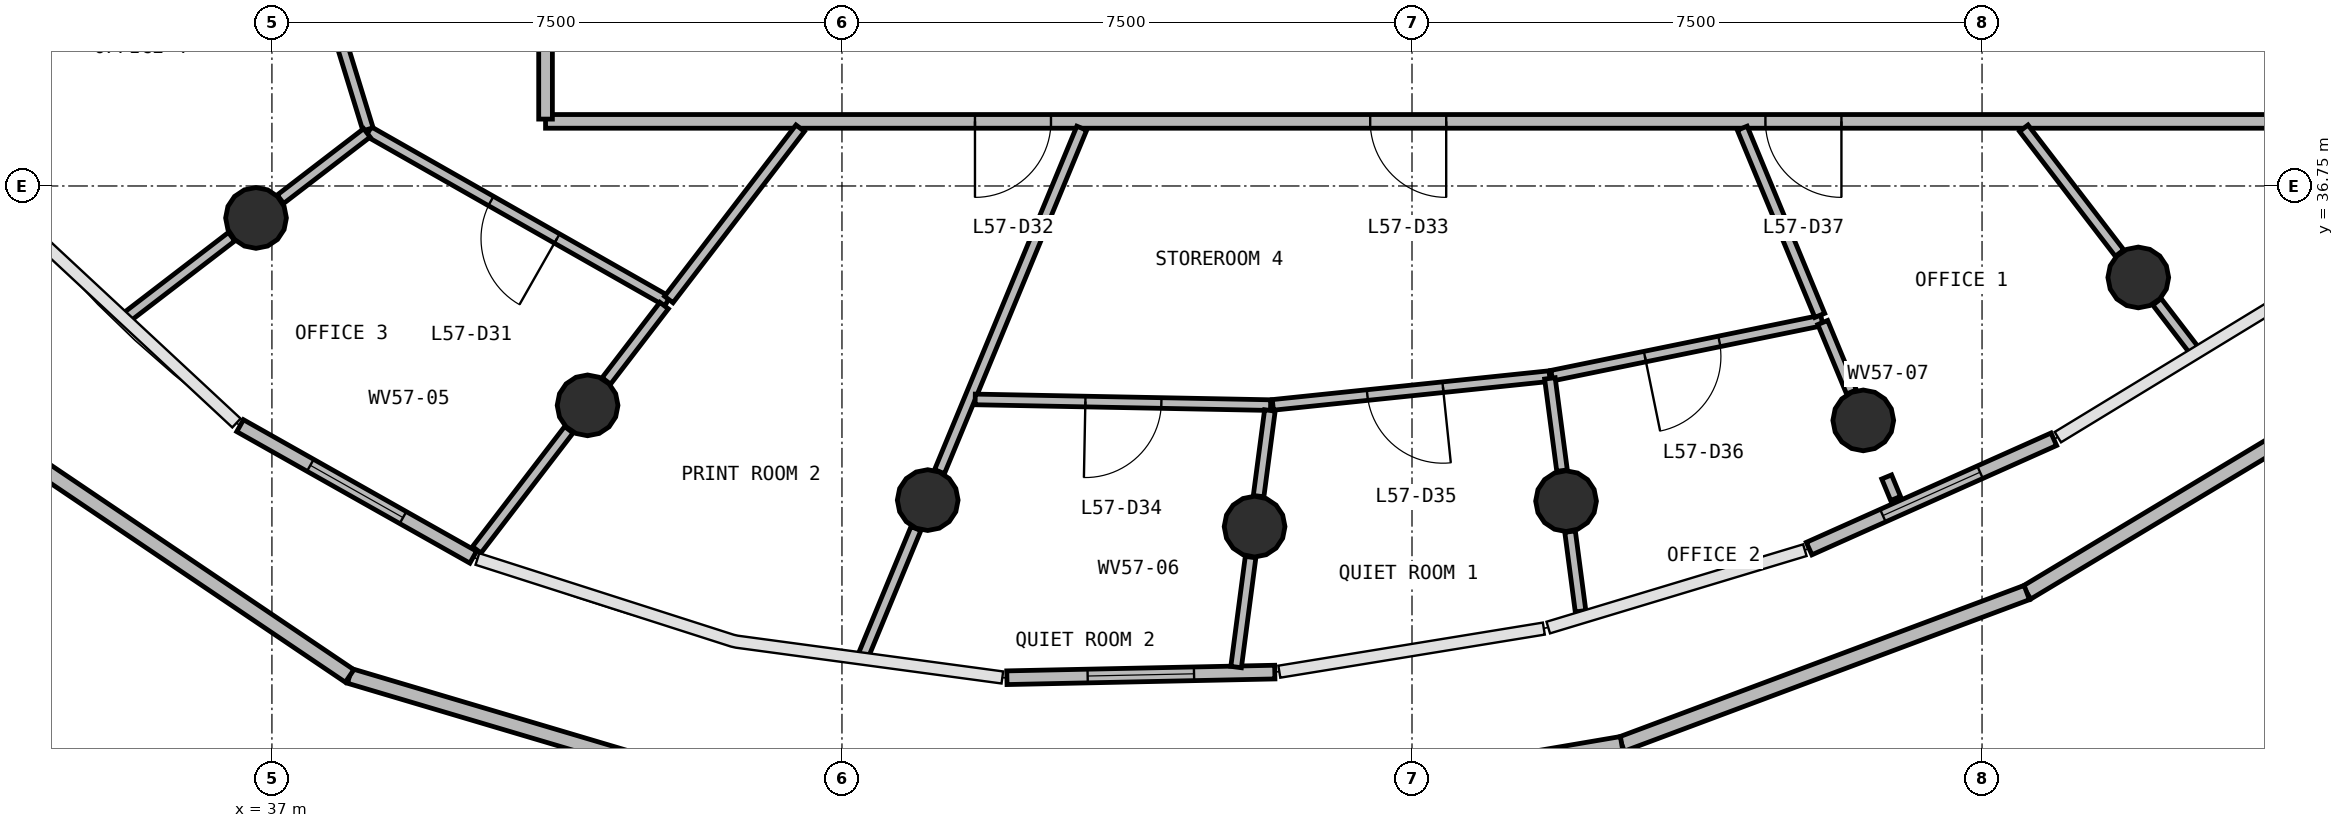
"""IFC4 building model, lengths in metres.
Left out: names, types, materials, properties, quantities, classifications, styles, units other than length and angle.
Written with IfcOpenShell. Run it as: python <this file> out.ifc"""

import sys

from ifc_helpers import new_model, si_unit, direction, frame, frame_2d, origin, origin_2d, place, context, subcontext, project, spatial, rectangle, circle, extrude, source, transform, mapped, element, fill, save


model = new_model("IFC4")
c1 = context("Model", 3, precision=1e-05, world=origin(), true_north=direction((0.0, 1.0)))
c2 = subcontext(c1, "Body", "Model", "MODEL_VIEW")
j1 = project(units=[si_unit("LENGTHUNIT", "METRE"), si_unit("PLANEANGLEUNIT", "RADIAN")], contexts=[c1])
p1 = place(None, origin())
s1 = spatial("IfcSite", under=j1, at=p1, CompositionType="ELEMENT")
p2 = place(p1, origin())
s2 = spatial("IfcBuilding", under=s1, at=p2, CompositionType="ELEMENT")
p3 = place(p2, frame((0.0, 0.0, 234.5)))
s3 = spatial("IfcBuildingStorey", under=s2, at=p3, CompositionType="ELEMENT", Elevation=234.5)
m1 = source(origin(), c2, "Body", "SweptSolid", [
    extrude(circle(Radius=0.4, at=origin_2d()), origin(), (0.0, 0.0, 1.0), 4.22),
])
for number, where, z_axis, x_axis in (
    (1, (36.791, 36.329, -0.32), (0.0, 0.0, 1.0), (1.0, 0.0, 0.0)),
    (2, (41.153, 33.864, -0.32), (0.0, 0.0, 1.0), (1.0, 0.0, 0.0)),
    (3, (45.628, 32.617, -0.32), (0.0, 0.0, 1.0), (1.0, 0.0, 0.0)),
    (4, (49.929, 32.269, -0.32), (0.0, 0.0, 1.0), (1.0, 0.0, 0.0)),
    (5, (54.027, 32.604, -0.32), (0.0, 0.0, 1.0), (1.0, 0.0, 0.0)),
    (6, (57.937, 33.666, -0.32), (0.0, 0.0, 1.0), (1.0, 0.0, 0.0)),
    (7, (61.556, 35.547, -0.32), (0.0, 0.0, 1.0), (1.0, 0.0, 0.0)),
):
    element("IfcColumn", number, at=place(p3, frame(where, z_axis=z_axis, x_axis=x_axis)), inside=s3, PredefinedType="COLUMN", context=c2, shape_type="MappedRepresentation", body=[
        mapped(m1, transform((0.0, 0.0, 0.0), scale=1.0)),
    ])
p4 = place(p3, frame((36.581, 33.597, 0.0), z_axis=(0.0, 0.0, 1.0), x_axis=(0.870989877484, -0.491300960023, 0.0)))
e8 = element("IfcWall", 8, at=p4, inside=s3, PredefinedType="STANDARD", context=c2, shape_type="SweptSolid", body=[
    extrude(rectangle(XDim=3.522, YDim=0.18, at=frame_2d((1.761, 0.0))), origin(), (0.0, 0.0, 1.0), 3.58),
])
p5 = place(p4, frame((1.061, 0.0, 0.9)))
e9 = element("IfcOpeningElement", 9, at=p5, cuts=e8, PredefinedType="OPENING", context=c2, shape_type="SweptSolid", body=[
    extrude(rectangle(XDim=1.4, YDim=2.0, at=frame_2d((0.7, 1.0))), frame((0.0, 0.1, 0.0), z_axis=(0.0, -1.0, 0.0), x_axis=(1.0, 0.0, 0.0)), (0.0, 0.0, 1.0), 0.2),
])
p6 = place(p3, frame((46.67, 30.281, 0.0), z_axis=(0.0, 0.0, 1.0), x_axis=(0.999778374941, 0.021052339543, 0.0)))
e10 = element("IfcWall", 10, at=p6, inside=s3, PredefinedType="STANDARD", context=c2, shape_type="SweptSolid", body=[
    extrude(rectangle(XDim=3.525, YDim=0.18, at=frame_2d((1.763, 0.0))), origin(), (0.0, 0.0, 1.0), 3.58),
])
p7 = place(p6, frame((1.063, 0.0, 0.9)))
e11 = element("IfcOpeningElement", 11, at=p7, cuts=e10, PredefinedType="OPENING", context=c2, shape_type="SweptSolid", body=[
    extrude(rectangle(XDim=1.4, YDim=2.0, at=frame_2d((0.7, 1.0))), frame((0.0, 0.1, 0.0), z_axis=(0.0, -1.0, 0.0), x_axis=(1.0, 0.0, 0.0)), (0.0, 0.0, 1.0), 0.2),
])
p8 = place(p3, frame((57.225, 31.979, 0.0), z_axis=(0.0, 0.0, 1.0), x_axis=(0.913021877142, 0.407910592973, 0.0)))
e12 = element("IfcWall", 12, at=p8, inside=s3, PredefinedType="STANDARD", context=c2, shape_type="SweptSolid", body=[
    extrude(rectangle(XDim=3.526, YDim=0.18, at=frame_2d((1.763, 0.0))), origin(), (0.0, 0.0, 1.0), 3.58),
])
p9 = place(p8, frame((1.063, 0.0, 0.9)))
e13 = element("IfcOpeningElement", 13, at=p9, cuts=e12, PredefinedType="OPENING", context=c2, shape_type="SweptSolid", body=[
    extrude(rectangle(XDim=1.4, YDim=2.0, at=frame_2d((0.7, 1.0))), frame((0.0, 0.1, 0.0), z_axis=(0.0, -1.0, 0.0), x_axis=(1.0, 0.0, 0.0)), (0.0, 0.0, 1.0), 0.2),
])
p10 = place(p3, frame((64.967, 34.332, 0.0), z_axis=(0.0, 0.0, 1.0), x_axis=(-0.857208875939, -0.51496887577, 0.0)))
e14 = element("IfcWall", 14, at=p10, inside=s3, PredefinedType="PARAPET", context=c2, shape_type="SweptSolid", body=[
    extrude(rectangle(XDim=5.69, YDim=0.2, at=frame_2d((2.845, 0.0))), origin(), (0.0, 0.0, 1.0), 1.1),
])
p11 = place(p3, frame((60.089, 31.401, 0.0), z_axis=(0.0, 0.0, 1.0), x_axis=(-0.936639117681, -0.350295822456, 0.0)))
e15 = element("IfcWall", 15, at=p11, inside=s3, PredefinedType="PARAPET", context=c2, shape_type="SweptSolid", body=[
    extrude(rectangle(XDim=5.691, YDim=0.2, at=frame_2d((2.845, 0.0))), origin(), (0.0, 0.0, 1.0), 1.1),
])
p12 = place(p3, frame((54.759, 29.408, 0.0), z_axis=(0.0, 0.0, 1.0), x_axis=(-0.985817393896, -0.167821529883, 0.0)))
e16 = element("IfcWall", 16, at=p12, inside=s3, PredefinedType="PARAPET", context=c2, shape_type="SweptSolid", body=[
    extrude(rectangle(XDim=5.69, YDim=0.2, at=frame_2d((2.845, 0.0))), origin(), (0.0, 0.0, 1.0), 1.1),
])
p13 = place(p3, frame((43.468, 28.687, 0.0), z_axis=(0.0, 0.0, 1.0), x_axis=(-0.958624512287, 0.284673575244, 0.0)))
e17 = element("IfcWall", 17, at=p13, inside=s3, PredefinedType="PARAPET", context=c2, shape_type="SweptSolid", body=[
    extrude(rectangle(XDim=5.681, YDim=0.2, at=frame_2d((2.84, 0.0))), origin(), (0.0, 0.0, 1.0), 1.1),
])
p14 = place(p3, frame((38.022, 30.304, 0.0), z_axis=(0.0, 0.0, 1.0), x_axis=(-0.828871130332, 0.559439585033, 0.0)))
e18 = element("IfcWall", 18, at=p14, inside=s3, PredefinedType="PARAPET", context=c2, shape_type="SweptSolid", body=[
    extrude(rectangle(XDim=5.671, YDim=0.2, at=frame_2d((2.836, 0.0))), origin(), (0.0, 0.0, 1.0), 1.1),
])
p15 = place(p3, frame((63.4, 37.6, 0.0), z_axis=(0.0, 0.0, 1.0), x_axis=(-1.0, 0.0, 0.0)))
e19 = element("IfcWall", 19, at=p15, inside=s3, PredefinedType="PARTITIONING", context=c2, shape_type="SweptSolid", body=[
    extrude(rectangle(XDim=22.8, YDim=0.18, at=frame_2d((11.4, 0.0))), origin(), (0.0, 0.0, 1.0), 2.88),
])
p16 = place(p15, frame((16.15, 0.0, 0.0)))
e20 = element("IfcOpeningElement", 20, at=p16, cuts=e19, PredefinedType="OPENING", context=c2, shape_type="SweptSolid", body=[
    extrude(rectangle(XDim=1.0, YDim=2.1, at=frame_2d((0.5, 1.05))), frame((0.0, 0.1, 0.0), z_axis=(0.0, -1.0, 0.0), x_axis=(1.0, 0.0, 0.0)), (0.0, 0.0, 1.0), 0.2),
])
p17 = place(p15, frame((10.95, 0.0, 0.0)))
e21 = element("IfcOpeningElement", 21, at=p17, cuts=e19, PredefinedType="OPENING", context=c2, shape_type="SweptSolid", body=[
    extrude(rectangle(XDim=1.0, YDim=2.1, at=frame_2d((0.5, 1.05))), frame((0.0, 0.1, 0.0), z_axis=(0.0, -1.0, 0.0), x_axis=(1.0, 0.0, 0.0)), (0.0, 0.0, 1.0), 0.2),
])
p18 = place(p15, frame((5.75, 0.0, 0.0)))
e22 = element("IfcOpeningElement", 22, at=p18, cuts=e19, PredefinedType="OPENING", context=c2, shape_type="SweptSolid", body=[
    extrude(rectangle(XDim=1.0, YDim=2.1, at=frame_2d((0.5, 1.05))), frame((0.0, 0.1, 0.0), z_axis=(0.0, -1.0, 0.0), x_axis=(1.0, 0.0, 0.0)), (0.0, 0.0, 1.0), 0.2),
])
p19 = place(p3, frame((40.6, 37.63, 0.0), z_axis=(0.0, 0.0, 1.0), x_axis=(0.0, 1.0, 0.0)))
e23 = element("IfcWall", 23, at=p19, inside=s3, PredefinedType="PARTITIONING", context=c2, shape_type="SweptSolid", body=[
    extrude(rectangle(XDim=20.74, YDim=0.18, at=frame_2d((10.37, 0.0))), origin(), (0.0, 0.0, 1.0), 2.88),
])
p20 = place(p19, frame((9.89, 0.0, 0.0)))
e24 = element("IfcOpeningElement", 24, at=p20, cuts=e23, PredefinedType="OPENING", context=c2, shape_type="SweptSolid", body=[
    extrude(rectangle(XDim=1.0, YDim=2.1, at=frame_2d((0.5, 1.05))), frame((0.0, 0.1, 0.0), z_axis=(0.0, -1.0, 0.0), x_axis=(1.0, 0.0, 0.0)), (0.0, 0.0, 1.0), 0.2),
])
p21 = place(p19, frame((7.69, 0.0, 0.0)))
e25 = element("IfcOpeningElement", 25, at=p21, cuts=e23, PredefinedType="OPENING", context=c2, shape_type="SweptSolid", body=[
    extrude(rectangle(XDim=1.0, YDim=2.1, at=frame_2d((0.5, 1.05))), frame((0.0, 0.1, 0.0), z_axis=(0.0, -1.0, 0.0), x_axis=(1.0, 0.0, 0.0)), (0.0, 0.0, 1.0), 0.2),
])
p22 = place(p3, frame((45.783, 32.992, 0.0), z_axis=(0.0, 0.0, 1.0), x_axis=(0.382689806821, 0.923876892099, 0.0)))
e26 = element("IfcWall", 26, at=p22, inside=s3, PredefinedType="PARTITIONING", context=c2, shape_type="SweptSolid", body=[
    extrude(rectangle(XDim=4.891, YDim=0.14, at=frame_2d((2.445, 0.0))), origin(), (0.0, 0.0, 1.0), 2.88),
])
p23 = place(p3, frame((42.203, 35.233, 0.0), z_axis=(0.0, 0.0, 1.0), x_axis=(-0.869307862445, 0.494271019068, 0.0)))
e27 = element("IfcWall", 27, at=p23, inside=s3, PredefinedType="PARTITIONING", context=c2, shape_type="SweptSolid", body=[
    extrude(rectangle(XDim=4.521, YDim=0.14, at=frame_2d((2.26, 0.0))), origin(), (0.0, 0.0, 1.0), 2.88),
])
p24 = place(p23, frame((1.671, 0.0, 0.0)))
e28 = element("IfcOpeningElement", 28, at=p24, cuts=e27, PredefinedType="OPENING", context=c2, shape_type="SweptSolid", body=[
    extrude(rectangle(XDim=1.0, YDim=2.1, at=frame_2d((0.5, 1.05))), frame((0.0, 0.08, 0.0), z_axis=(0.0, -1.0, 0.0), x_axis=(1.0, 0.0, 0.0)), (0.0, 0.0, 1.0), 0.16),
])
p25 = place(p3, frame((38.264, 37.496, 0.0), z_axis=(0.0, 0.0, 1.0), x_axis=(-0.293913060846, 0.955832157162, 0.0)))
e29 = element("IfcWall", 29, at=p25, inside=s3, PredefinedType="PARTITIONING", context=c2, shape_type="SweptSolid", body=[
    extrude(rectangle(XDim=4.468, YDim=0.14, at=frame_2d((2.234, 0.0))), origin(), (0.0, 0.0, 1.0), 2.88),
])
p26 = place(p25, frame((1.818, 0.0, 0.0)))
e30 = element("IfcOpeningElement", 30, at=p26, cuts=e29, PredefinedType="OPENING", context=c2, shape_type="SweptSolid", body=[
    extrude(rectangle(XDim=1.0, YDim=2.1, at=frame_2d((0.5, 1.05))), frame((0.0, 0.08, 0.0), z_axis=(0.0, -1.0, 0.0), x_axis=(1.0, 0.0, 0.0)), (0.0, 0.0, 1.0), 0.16),
])
p27 = place(p3, frame((41.399, 34.185, 0.0), z_axis=(0.0, 0.0, 1.0), x_axis=(0.608870244727, 0.793269831196, 0.0)))
e31 = element("IfcWall", 31, at=p27, inside=s3, PredefinedType="PARTITIONING", context=c2, shape_type="SweptSolid", body=[
    extrude(rectangle(XDim=1.25, YDim=0.14, at=frame_2d((0.625, 0.0))), origin(), (0.0, 0.0, 1.0), 2.88),
])
p28 = place(p3, frame((42.221, 35.257, 0.0), z_axis=(0.0, 0.0, 1.0), x_axis=(0.608792367533, 0.793329599368, 0.0)))
e32 = element("IfcWall", 32, at=p28, inside=s3, PredefinedType="PARTITIONING", context=c2, shape_type="SweptSolid", body=[
    extrude(rectangle(XDim=2.841, YDim=0.14, at=frame_2d((1.42, 0.0))), origin(), (0.0, 0.0, 1.0), 2.88),
])
p29 = place(p3, frame((50.139, 33.867, 0.0), z_axis=(0.0, 0.0, 1.0), x_axis=(-0.999814117064, 0.019280335046, 0.0)))
e33 = element("IfcWall", 33, at=p29, inside=s3, PredefinedType="PARTITIONING", context=c2, shape_type="SweptSolid", body=[
    extrude(rectangle(XDim=3.887, YDim=0.14, at=frame_2d((1.944, 0.0))), origin(), (0.0, 0.0, 1.0), 2.88),
])
p30 = place(p29, frame((1.437, 0.0, 0.0)))
e34 = element("IfcOpeningElement", 34, at=p30, cuts=e33, PredefinedType="OPENING", context=c2, shape_type="SweptSolid", body=[
    extrude(rectangle(XDim=1.0, YDim=2.1, at=frame_2d((0.5, 1.05))), frame((0.0, 0.08, 0.0), z_axis=(0.0, -1.0, 0.0), x_axis=(1.0, 0.0, 0.0)), (0.0, 0.0, 1.0), 0.16),
])
p31 = place(p3, frame((53.81, 34.249, 0.0), z_axis=(0.0, 0.0, 1.0), x_axis=(-0.994635862238, -0.103438394953, 0.0)))
e35 = element("IfcWall", 35, at=p31, inside=s3, PredefinedType="PARTITIONING", context=c2, shape_type="SweptSolid", body=[
    extrude(rectangle(XDim=3.661, YDim=0.14, at=frame_2d((1.83, 0.0))), origin(), (0.0, 0.0, 1.0), 2.88),
])
p32 = place(p31, frame((1.411, 0.0, 0.0)))
e36 = element("IfcOpeningElement", 36, at=p32, cuts=e35, PredefinedType="OPENING", context=c2, shape_type="SweptSolid", body=[
    extrude(rectangle(XDim=1.0, YDim=2.1, at=frame_2d((0.5, 1.05))), frame((0.0, 0.08, 0.0), z_axis=(0.0, -1.0, 0.0), x_axis=(1.0, 0.0, 0.0)), (0.0, 0.0, 1.0), 0.16),
])
p33 = place(p3, frame((57.392, 34.982, 0.0), z_axis=(0.0, 0.0, 1.0), x_axis=(-0.97970621896, -0.200438829898, 0.0)))
e37 = element("IfcWall", 37, at=p33, inside=s3, PredefinedType="PARTITIONING", context=c2, shape_type="SweptSolid", body=[
    extrude(rectangle(XDim=3.626, YDim=0.14, at=frame_2d((1.813, 0.0))), origin(), (0.0, 0.0, 1.0), 2.88),
])
p34 = place(p33, frame((1.376, 0.0, 0.0)))
e38 = element("IfcOpeningElement", 38, at=p34, cuts=e37, PredefinedType="OPENING", context=c2, shape_type="SweptSolid", body=[
    extrude(rectangle(XDim=1.0, YDim=2.1, at=frame_2d((0.5, 1.05))), frame((0.0, 0.08, 0.0), z_axis=(0.0, -1.0, 0.0), x_axis=(1.0, 0.0, 0.0)), (0.0, 0.0, 1.0), 0.16),
])
p35 = place(p3, frame((56.345, 37.51, 0.0), z_axis=(0.0, 0.0, 1.0), x_axis=(0.382624166052, -0.923904079195, 0.0)))
e39 = element("IfcWall", 39, at=p35, inside=s3, PredefinedType="PARTITIONING", context=c2, shape_type="SweptSolid", body=[
    extrude(rectangle(XDim=2.665, YDim=0.14, at=frame_2d((1.333, 0.0))), origin(), (0.0, 0.0, 1.0), 2.88),
])
p36 = place(p3, frame((60.049, 37.51, 0.0), z_axis=(0.0, 0.0, 1.0), x_axis=(0.608701397958, -0.793399400128, 0.0)))
e40 = element("IfcWall", 40, at=p36, inside=s3, PredefinedType="PARTITIONING", context=c2, shape_type="SweptSolid", body=[
    extrude(rectangle(XDim=2.07, YDim=0.14, at=frame_2d((1.035, 0.0))), origin(), (0.0, 0.0, 1.0), 2.88),
])
p37 = place(p3, frame((39.695, 31.964, 0.0), z_axis=(0.0, 0.0, 1.0), x_axis=(0.608714685666, 0.793389205532, 0.0)))
e41 = element("IfcWall", 41, at=p37, inside=s3, PredefinedType="PARTITIONING", context=c2, shape_type="SweptSolid", body=[
    extrude(rectangle(XDim=1.991, YDim=0.14, at=frame_2d((0.996, 0.0))), origin(), (0.0, 0.0, 1.0), 2.88),
])
p38 = place(p3, frame((45.473, 32.243, 0.0), z_axis=(0.0, 0.0, 1.0), x_axis=(-0.382692713278, -0.923875688177, 0.0)))
e42 = element("IfcWall", 42, at=p38, inside=s3, PredefinedType="PARTITIONING", context=c2, shape_type="SweptSolid", body=[
    extrude(rectangle(XDim=1.813, YDim=0.14, at=frame_2d((0.906, 0.0))), origin(), (0.0, 0.0, 1.0), 2.88),
])
p39 = place(p3, frame((36.469, 36.083, 0.0), z_axis=(0.0, 0.0, 1.0), x_axis=(-0.793354095368, -0.608760444973, 0.0)))
e43 = element("IfcWall", 43, at=p39, inside=s3, PredefinedType="PARTITIONING", context=c2, shape_type="SweptSolid", body=[
    extrude(rectangle(XDim=1.776, YDim=0.14, at=frame_2d((0.888, 0.0))), origin(), (0.0, 0.0, 1.0), 2.88),
])
p40 = place(p3, frame((38.25, 37.449, 0.0), z_axis=(0.0, 0.0, 1.0), x_axis=(-0.793313149545, -0.60881380303, 0.0)))
e44 = element("IfcWall", 44, at=p40, inside=s3, PredefinedType="PARTITIONING", context=c2, shape_type="SweptSolid", body=[
    extrude(rectangle(XDim=1.434, YDim=0.14, at=frame_2d((0.717, 0.0))), origin(), (0.0, 0.0, 1.0), 2.88),
])
p41 = place(p3, frame((49.876, 31.868, 0.0), z_axis=(0.0, 0.0, 1.0), x_axis=(-0.130519440536, -0.991445750226, 0.0)))
e45 = element("IfcWall", 45, at=p41, inside=s3, PredefinedType="PARTITIONING", context=c2, shape_type="SweptSolid", body=[
    extrude(rectangle(XDim=1.459, YDim=0.14, at=frame_2d((0.729, 0.0))), origin(), (0.0, 0.0, 1.0), 2.88),
])
p42 = place(p3, frame((53.814, 34.219, 0.0), z_axis=(0.0, 0.0, 1.0), x_axis=(0.130583439875, -0.991437322896, 0.0)))
e46 = element("IfcWall", 46, at=p42, inside=s3, PredefinedType="PARTITIONING", context=c2, shape_type="SweptSolid", body=[
    extrude(rectangle(XDim=1.225, YDim=0.14, at=frame_2d((0.612, 0.0))), origin(), (0.0, 0.0, 1.0), 2.88),
])
p43 = place(p3, frame((50.13, 33.797, 0.0), z_axis=(0.0, 0.0, 1.0), x_axis=(-0.13056005306, -0.991440402921, 0.0)))
e47 = element("IfcWall", 47, at=p43, inside=s3, PredefinedType="PARTITIONING", context=c2, shape_type="SweptSolid", body=[
    extrude(rectangle(XDim=1.137, YDim=0.14, at=frame_2d((0.568, 0.0))), origin(), (0.0, 0.0, 1.0), 2.88),
])
p44 = place(p3, frame((54.08, 32.203, 0.0), z_axis=(0.0, 0.0, 1.0), x_axis=(0.13054416447, -0.991442495116, 0.0)))
e48 = element("IfcWall", 48, at=p44, inside=s3, PredefinedType="PARTITIONING", context=c2, shape_type="SweptSolid", body=[
    extrude(rectangle(XDim=1.057, YDim=0.14, at=frame_2d((0.528, 0.0))), origin(), (0.0, 0.0, 1.0), 2.88),
])
p45 = place(p3, frame((57.404, 34.954, 0.0), z_axis=(0.0, 0.0, 1.0), x_axis=(0.382686140255, -0.923878410862, 0.0)))
e49 = element("IfcWall", 49, at=p45, inside=s3, PredefinedType="PARTITIONING", context=c2, shape_type="SweptSolid", body=[
    extrude(rectangle(XDim=0.989, YDim=0.14, at=frame_2d((0.494, 0.0))), origin(), (0.0, 0.0, 1.0), 2.88),
])
p46 = place(p3, frame((61.802, 35.226, 0.0), z_axis=(0.0, 0.0, 1.0), x_axis=(0.608755530265, -0.793357866522, 0.0)))
e50 = element("IfcWall", 50, at=p46, inside=s3, PredefinedType="PARTITIONING", context=c2, shape_type="SweptSolid", body=[
    extrude(rectangle(XDim=0.791, YDim=0.14, at=frame_2d((0.396, 0.0))), origin(), (0.0, 0.0, 1.0), 2.88),
])
p47 = place(p3, frame((58.245, 32.922, 0.0), z_axis=(0.0, 0.0, 1.0), x_axis=(0.382468842715, -0.92396838926, 0.0)))
e51 = element("IfcWall", 51, at=p47, inside=s3, PredefinedType="PARTITIONING", context=c2, shape_type="SweptSolid", body=[
    extrude(rectangle(XDim=0.307, YDim=0.14, at=frame_2d((0.154, 0.0))), origin(), (0.0, 0.0, 1.0), 2.88),
])
m2 = source(origin(), c2, "Body", "SweptSolid", [
    extrude(rectangle(XDim=1.4, YDim=2.0, at=frame_2d((0.7, 1.0))), frame((0.0, 0.03, 0.0), z_axis=(0.0, -1.0, 0.0), x_axis=(1.0, 0.0, 0.0)), (0.0, 0.0, 1.0), 0.06),
])
p48 = place(p5, origin())
e52 = element("IfcWindow", 52, at=p48, inside=s3, PartitioningType="SINGLE_PANEL", PredefinedType="WINDOW", context=c2, shape_type="MappedRepresentation", body=[
    mapped(m2, transform((0.0, 0.0, 0.0), scale=1.0)),
])
fill(e9, e52)
p49 = place(p7, origin())
e53 = element("IfcWindow", 53, at=p49, inside=s3, PartitioningType="SINGLE_PANEL", PredefinedType="WINDOW", context=c2, shape_type="MappedRepresentation", body=[
    mapped(m2, transform((0.0, 0.0, 0.0), scale=1.0)),
])
fill(e11, e53)
p50 = place(p9, origin())
e54 = element("IfcWindow", 54, at=p50, inside=s3, PartitioningType="SINGLE_PANEL", PredefinedType="WINDOW", context=c2, shape_type="MappedRepresentation", body=[
    mapped(m2, transform((0.0, 0.0, 0.0), scale=1.0)),
])
fill(e13, e54)
m3 = source(origin(), c2, "Body", "SweptSolid", [
    extrude(rectangle(XDim=1.0, YDim=2.1, at=frame_2d((0.5, 1.05))), frame((0.0, 0.025, 0.0), z_axis=(0.0, -1.0, 0.0), x_axis=(1.0, 0.0, 0.0)), (0.0, 0.0, 1.0), 0.05),
])
p51 = place(p24, origin())
e55 = element("IfcDoor", 55, at=p51, inside=s3, OperationType="SINGLE_SWING_LEFT", PredefinedType="DOOR", context=c2, shape_type="MappedRepresentation", body=[
    mapped(m3, transform((0.0, 0.0, 0.0), scale=1.0)),
])
fill(e28, e55)
p52 = place(p16, origin())
e56 = element("IfcDoor", 56, at=p52, inside=s3, OperationType="SINGLE_SWING_RIGHT", PredefinedType="DOOR", context=c2, shape_type="MappedRepresentation", body=[
    mapped(m3, transform((0.0, 0.0, 0.0), scale=1.0)),
])
fill(e20, e56)
p53 = place(p17, origin())
e57 = element("IfcDoor", 57, at=p53, inside=s3, OperationType="SINGLE_SWING_LEFT", PredefinedType="DOOR", context=c2, shape_type="MappedRepresentation", body=[
    mapped(m3, transform((0.0, 0.0, 0.0), scale=1.0)),
])
fill(e21, e57)
p54 = place(p30, origin())
e58 = element("IfcDoor", 58, at=p54, inside=s3, OperationType="SINGLE_SWING_RIGHT", PredefinedType="DOOR", context=c2, shape_type="MappedRepresentation", body=[
    mapped(m3, transform((0.0, 0.0, 0.0), scale=1.0)),
])
fill(e34, e58)
p55 = place(p32, origin())
e59 = element("IfcDoor", 59, at=p55, inside=s3, OperationType="SINGLE_SWING_LEFT", PredefinedType="DOOR", context=c2, shape_type="MappedRepresentation", body=[
    mapped(m3, transform((0.0, 0.0, 0.0), scale=1.0)),
])
fill(e36, e59)
p56 = place(p34, origin())
e60 = element("IfcDoor", 60, at=p56, inside=s3, OperationType="SINGLE_SWING_RIGHT", PredefinedType="DOOR", context=c2, shape_type="MappedRepresentation", body=[
    mapped(m3, transform((0.0, 0.0, 0.0), scale=1.0)),
])
fill(e38, e60)
p57 = place(p18, origin())
e61 = element("IfcDoor", 61, at=p57, inside=s3, OperationType="SINGLE_SWING_LEFT", PredefinedType="DOOR", context=c2, shape_type="MappedRepresentation", body=[
    mapped(m3, transform((0.0, 0.0, 0.0), scale=1.0)),
])
fill(e22, e61)
save(model, sys.argv[1])
